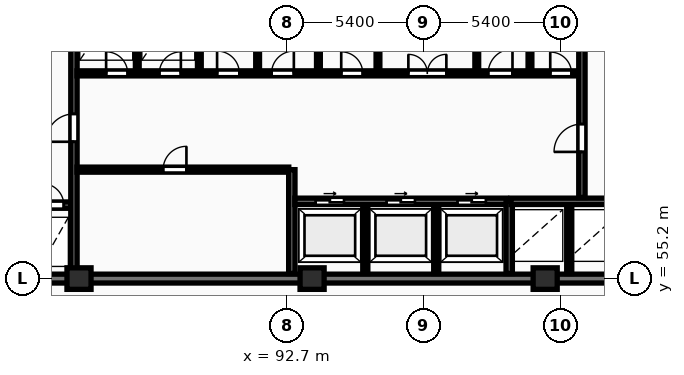
"""IFC4 building model, lengths in metres.
Left out: names, types, materials, properties, quantities, classifications, styles, units other than length and angle.
Written with IfcOpenShell. Run it as: python <this file> out.ifc"""

import sys

from ifc_helpers import new_model, si_unit, direction, frame, frame_2d, origin, origin_2d, place, context, subcontext, project, spatial, rectangle, extrude, element, fill, save


model = new_model("IFC4")
c1 = context("Model", 3, precision=1e-05, world=origin(), true_north=direction((0.0, 1.0)))
c2 = subcontext(c1, "Body", "Model", "MODEL_VIEW")
j1 = project(units=[si_unit("LENGTHUNIT", "METRE"), si_unit("PLANEANGLEUNIT", "RADIAN")], contexts=[c1])
p1 = place(None, origin())
s1 = spatial("IfcSite", under=j1, at=p1, CompositionType="ELEMENT")
p2 = place(p1, origin())
s2 = spatial("IfcBuilding", under=s1, at=p2, CompositionType="ELEMENT")
p3 = place(p2, frame((0.0, 0.0, 100.3)))
s3 = spatial("IfcBuildingStorey", under=s2, at=p3, CompositionType="ELEMENT", Elevation=100.3)
for number, where, z_axis, x_axis in (
    (1, (84.5, 55.2, 0.0), (0.0, 0.0, 1.0), (1.0, 0.0, 0.0)),
    (2, (93.7, 55.2, 0.0), (0.0, 0.0, 1.0), (1.0, 0.0, 0.0)),
    (3, (102.9, 55.2, 0.0), (0.0, 0.0, 1.0), (1.0, 0.0, 0.0)),
):
    element("IfcColumn", number, at=place(p3, frame(where, z_axis=z_axis, x_axis=x_axis)), inside=s3, PredefinedType="COLUMN", context=c2, shape_type="SweptSolid", body=[
        extrude(rectangle(XDim=0.95, YDim=0.85, at=origin_2d()), origin(), (0.0, 0.0, 1.0), 3.25),
    ])
p4 = place(p3, frame((75.95, 55.2, 0.0), z_axis=(0.0, 0.0, 1.0), x_axis=(1.0, 0.0, 0.0)))
e4 = element("IfcWall", 4, at=p4, inside=s3, PredefinedType="SHEAR", context=c2, shape_type="SweptSolid", body=[
    extrude(rectangle(XDim=36.3, YDim=0.35, at=frame_2d((18.15, 0.0))), origin(), (0.0, 0.0, 1.0), 3.25),
])
p5 = place(p3, frame((79.79, 58.1, 0.0), z_axis=(0.0, 0.0, 1.0), x_axis=(1.0, 0.0, 0.0)))
e5 = element("IfcWall", 5, at=p5, inside=s3, PredefinedType="SHEAR", context=c2, shape_type="SweptSolid", body=[
    extrude(rectangle(XDim=4.39, YDim=0.25, at=frame_2d((2.195, 0.0))), origin(), (0.0, 0.0, 1.0), 3.25),
])
p6 = place(p5, frame((1.05, 0.0, 0.0)))
e6 = element("IfcOpeningElement", 6, at=p6, cuts=e5, PredefinedType="OPENING", context=c2, shape_type="SweptSolid", body=[
    extrude(rectangle(XDim=1.12, YDim=2.12, at=frame_2d((0.56, 1.06))), frame((0.0, 0.135, 0.0), z_axis=(0.0, -1.0, 0.0), x_axis=(1.0, 0.0, 0.0)), (0.0, 0.0, 1.0), 0.27),
])
p7 = place(p5, frame((3.26, 0.0, 0.0)))
e7 = element("IfcOpeningElement", 7, at=p7, cuts=e5, PredefinedType="OPENING", context=c2, shape_type="SweptSolid", body=[
    extrude(rectangle(XDim=0.85, YDim=2.05, at=frame_2d((0.425, 1.025))), frame((0.0, 0.135, 0.0), z_axis=(0.0, -1.0, 0.0), x_axis=(1.0, 0.0, 0.0)), (0.0, 0.0, 1.0), 0.27),
])
p8 = place(p3, frame((84.3, 55.4, 0.0), z_axis=(0.0, 0.0, 1.0), x_axis=(0.0, 1.0, 0.0)))
e8 = element("IfcWall", 8, at=p8, inside=s3, PredefinedType="SHEAR", context=c2, shape_type="SweptSolid", body=[
    extrude(rectangle(XDim=11.6, YDim=0.25, at=frame_2d((5.8, 0.0))), origin(), (0.0, 0.0, 1.0), 3.25),
])
p9 = place(p8, frame((5.2, 0.0, 0.0)))
e9 = element("IfcOpeningElement", 9, at=p9, cuts=e8, PredefinedType="OPENING", context=c2, shape_type="SweptSolid", body=[
    extrude(rectangle(XDim=1.1, YDim=2.1, at=frame_2d((0.55, 1.05))), frame((0.0, 0.135, 0.0), z_axis=(0.0, -1.0, 0.0), x_axis=(1.0, 0.0, 0.0)), (0.0, 0.0, 1.0), 0.27),
])
p10 = place(p3, frame((84.42, 59.5, 0.0), z_axis=(0.0, 0.0, 1.0), x_axis=(1.0, 0.0, 0.0)))
e10 = element("IfcWall", 10, at=p10, inside=s3, PredefinedType="PARTITIONING", context=c2, shape_type="SweptSolid", body=[
    extrude(rectangle(XDim=8.36, YDim=0.2, at=frame_2d((4.18, 0.0))), origin(), (0.0, 0.0, 1.0), 2.97),
])
p11 = place(p10, frame((3.4, 0.0, 0.0)))
e11 = element("IfcOpeningElement", 11, at=p11, cuts=e10, PredefinedType="OPENING", context=c2, shape_type="SweptSolid", body=[
    extrude(rectangle(XDim=0.92, YDim=2.08, at=frame_2d((0.46, 1.04))), frame((0.0, 0.11, 0.0), z_axis=(0.0, -1.0, 0.0), x_axis=(1.0, 0.0, 0.0)), (0.0, 0.0, 1.0), 0.22),
])
p12 = place(p3, frame((92.9, 55.4, 0.0), z_axis=(0.0, 0.0, 1.0), x_axis=(0.0, 1.0, 0.0)))
e12 = element("IfcWall", 12, at=p12, inside=s3, PredefinedType="SHEAR", context=c2, shape_type="SweptSolid", body=[
    extrude(rectangle(XDim=4.1, YDim=0.25, at=frame_2d((2.05, 0.0))), origin(), (0.0, 0.0, 1.0), 3.25),
])
for number, where, z_axis, x_axis in (
    (13, (95.8, 55.4, 0.0), (0.0, 0.0, 1.0), (0.0, 1.0, 0.0)),
    (14, (98.6, 55.4, 0.0), (0.0, 0.0, 1.0), (0.0, 1.0, 0.0)),
):
    element("IfcWall", number, at=place(p3, frame(where, z_axis=z_axis, x_axis=x_axis)), inside=s3, PredefinedType="PARTITIONING", context=c2, shape_type="SweptSolid", body=[
        extrude(rectangle(XDim=2.72, YDim=0.2, at=frame_2d((1.36, 0.0))), origin(), (0.0, 0.0, 1.0), 2.97),
    ])
p13 = place(p3, frame((93.02, 58.25, 0.0), z_axis=(0.0, 0.0, 1.0), x_axis=(1.0, 0.0, 0.0)))
e15 = element("IfcWall", 15, at=p13, inside=s3, PredefinedType="SHEAR", context=c2, shape_type="SweptSolid", body=[
    extrude(rectangle(XDim=8.36, YDim=0.25, at=frame_2d((4.18, 0.0))), origin(), (0.0, 0.0, 1.0), 3.25),
])
p14 = place(p13, frame((0.82, 0.0, 0.0)))
e16 = element("IfcOpeningElement", 16, at=p14, cuts=e15, PredefinedType="OPENING", context=c2, shape_type="SweptSolid", body=[
    extrude(rectangle(XDim=1.12, YDim=2.12, at=frame_2d((0.56, 1.06))), frame((0.0, 0.135, 0.0), z_axis=(0.0, -1.0, 0.0), x_axis=(1.0, 0.0, 0.0)), (0.0, 0.0, 1.0), 0.27),
])
p15 = place(p13, frame((3.62, 0.0, 0.0)))
e17 = element("IfcOpeningElement", 17, at=p15, cuts=e15, PredefinedType="OPENING", context=c2, shape_type="SweptSolid", body=[
    extrude(rectangle(XDim=1.12, YDim=2.12, at=frame_2d((0.56, 1.06))), frame((0.0, 0.135, 0.0), z_axis=(0.0, -1.0, 0.0), x_axis=(1.0, 0.0, 0.0)), (0.0, 0.0, 1.0), 0.27),
])
p16 = place(p13, frame((6.42, 0.0, 0.0)))
e18 = element("IfcOpeningElement", 18, at=p16, cuts=e15, PredefinedType="OPENING", context=c2, shape_type="SweptSolid", body=[
    extrude(rectangle(XDim=1.12, YDim=2.12, at=frame_2d((0.56, 1.06))), frame((0.0, 0.135, 0.0), z_axis=(0.0, -1.0, 0.0), x_axis=(1.0, 0.0, 0.0)), (0.0, 0.0, 1.0), 0.27),
])
p17 = place(p3, frame((101.48, 55.4, 0.0), z_axis=(0.0, 0.0, 1.0), x_axis=(0.0, 1.0, 0.0)))
e19 = element("IfcWall", 19, at=p17, inside=s3, PredefinedType="SHEAR", context=c2, shape_type="SweptSolid", body=[
    extrude(rectangle(XDim=2.85, YDim=0.25, at=frame_2d((1.425, 0.0))), origin(), (0.0, 0.0, 1.0), 3.25),
])
p18 = place(p3, frame((103.85, 55.4, 0.0), z_axis=(0.0, 0.0, 1.0), x_axis=(0.0, 1.0, 0.0)))
e20 = element("IfcWall", 20, at=p18, inside=s3, PredefinedType="PARTITIONING", context=c2, shape_type="SweptSolid", body=[
    extrude(rectangle(XDim=2.72, YDim=0.2, at=frame_2d((1.36, 0.0))), origin(), (0.0, 0.0, 1.0), 2.97),
])
p19 = place(p3, frame((101.55, 58.25, 0.0), z_axis=(0.0, 0.0, 1.0), x_axis=(1.0, 0.0, 0.0)))
e21 = element("IfcWall", 21, at=p19, inside=s3, PredefinedType="SHEAR", context=c2, shape_type="SweptSolid", body=[
    extrude(rectangle(XDim=4.6, YDim=0.25, at=frame_2d((2.3, 0.0))), origin(), (0.0, 0.0, 1.0), 3.25),
])
for number, where, z_axis, x_axis in (
    (22, (86.8, 63.4, 0.0), (0.0, 0.0, 1.0), (0.0, 1.0, 0.0)),
    (23, (89.25, 63.4, 0.0), (0.0, 0.0, 1.0), (0.0, 1.0, 0.0)),
    (24, (91.55, 63.4, 0.0), (0.0, 0.0, 1.0), (0.0, 1.0, 0.0)),
):
    element("IfcWall", number, at=place(p3, frame(where, z_axis=z_axis, x_axis=x_axis)), inside=s3, PredefinedType="PARTITIONING", context=c2, shape_type="SweptSolid", body=[
        extrude(rectangle(XDim=3.6, YDim=0.15, at=frame_2d((1.8, 0.0))), origin(), (0.0, 0.0, 1.0), 2.97),
    ])
p20 = place(p3, frame((93.95, 63.4, 0.0), z_axis=(0.0, 0.0, 1.0), x_axis=(0.0, 1.0, 0.0)))
e25 = element("IfcWall", 25, at=p20, inside=s3, PredefinedType="PARTITIONING", context=c2, shape_type="SweptSolid", body=[
    extrude(rectangle(XDim=3.6, YDim=0.15, at=frame_2d((1.8, 0.0))), origin(), (0.0, 0.0, 1.0), 2.277),
])
for number, where, z_axis, x_axis in (
    (26, (102.3, 63.4, 0.0), (0.0, 0.0, 1.0), (0.0, 1.0, 0.0)),
    (27, (96.3, 63.4, 0.0), (0.0, 0.0, 1.0), (0.0, 1.0, 0.0)),
    (28, (100.2, 63.4, 0.0), (0.0, 0.0, 1.0), (0.0, 1.0, 0.0)),
):
    element("IfcWall", number, at=place(p3, frame(where, z_axis=z_axis, x_axis=x_axis)), inside=s3, PredefinedType="PARTITIONING", context=c2, shape_type="SweptSolid", body=[
        extrude(rectangle(XDim=3.6, YDim=0.15, at=frame_2d((1.8, 0.0))), origin(), (0.0, 0.0, 1.0), 2.97),
    ])
p21 = place(p3, frame((84.42, 63.3, 0.0), z_axis=(0.0, 0.0, 1.0), x_axis=(1.0, 0.0, 0.0)))
e29 = element("IfcWall", 29, at=p21, inside=s3, PredefinedType="PARTITIONING", context=c2, shape_type="SweptSolid", body=[
    extrude(rectangle(XDim=19.83, YDim=0.2, at=frame_2d((9.915, 0.0))), origin(), (0.0, 0.0, 1.0), 2.97),
])
p22 = place(p21, frame((1.15, 0.0, 0.0)))
e30 = element("IfcOpeningElement", 30, at=p22, cuts=e29, PredefinedType="OPENING", context=c2, shape_type="SweptSolid", body=[
    extrude(rectangle(XDim=0.85, YDim=2.05, at=frame_2d((0.425, 1.025))), frame((0.0, 0.11, 0.0), z_axis=(0.0, -1.0, 0.0), x_axis=(1.0, 0.0, 0.0)), (0.0, 0.0, 1.0), 0.22),
])
p23 = place(p21, frame((3.25, 0.0, 0.0)))
e31 = element("IfcOpeningElement", 31, at=p23, cuts=e29, PredefinedType="OPENING", context=c2, shape_type="SweptSolid", body=[
    extrude(rectangle(XDim=0.85, YDim=2.05, at=frame_2d((0.425, 1.025))), frame((0.0, 0.11, 0.0), z_axis=(0.0, -1.0, 0.0), x_axis=(1.0, 0.0, 0.0)), (0.0, 0.0, 1.0), 0.22),
])
p24 = place(p21, frame((13.08, 0.0, 0.0)))
e32 = element("IfcOpeningElement", 32, at=p24, cuts=e29, PredefinedType="OPENING", context=c2, shape_type="SweptSolid", body=[
    extrude(rectangle(XDim=1.5, YDim=2.2, at=frame_2d((0.75, 1.1))), frame((0.0, 0.11, 0.0), z_axis=(0.0, -1.0, 0.0), x_axis=(1.0, 0.0, 0.0)), (0.0, 0.0, 1.0), 0.22),
])
p25 = place(p21, frame((5.53, 0.0, 0.0)))
e33 = element("IfcOpeningElement", 33, at=p25, cuts=e29, PredefinedType="OPENING", context=c2, shape_type="SweptSolid", body=[
    extrude(rectangle(XDim=0.88, YDim=2.06, at=frame_2d((0.44, 1.03))), frame((0.0, 0.11, 0.0), z_axis=(0.0, -1.0, 0.0), x_axis=(1.0, 0.0, 0.0)), (0.0, 0.0, 1.0), 0.22),
])
p26 = place(p21, frame((7.68, 0.0, 0.0)))
e34 = element("IfcOpeningElement", 34, at=p26, cuts=e29, PredefinedType="OPENING", context=c2, shape_type="SweptSolid", body=[
    extrude(rectangle(XDim=0.88, YDim=2.06, at=frame_2d((0.44, 1.03))), frame((0.0, 0.11, 0.0), z_axis=(0.0, -1.0, 0.0), x_axis=(1.0, 0.0, 0.0)), (0.0, 0.0, 1.0), 0.22),
])
p27 = place(p21, frame((10.43, 0.0, 0.0)))
e35 = element("IfcOpeningElement", 35, at=p27, cuts=e29, PredefinedType="OPENING", context=c2, shape_type="SweptSolid", body=[
    extrude(rectangle(XDim=0.85, YDim=2.05, at=frame_2d((0.425, 1.025))), frame((0.0, 0.11, 0.0), z_axis=(0.0, -1.0, 0.0), x_axis=(1.0, 0.0, 0.0)), (0.0, 0.0, 1.0), 0.22),
])
p28 = place(p21, frame((16.23, 0.0, 0.0)))
e36 = element("IfcOpeningElement", 36, at=p28, cuts=e29, PredefinedType="OPENING", context=c2, shape_type="SweptSolid", body=[
    extrude(rectangle(XDim=0.96, YDim=2.1, at=frame_2d((0.48, 1.05))), frame((0.0, 0.11, 0.0), z_axis=(0.0, -1.0, 0.0), x_axis=(1.0, 0.0, 0.0)), (0.0, 0.0, 1.0), 0.22),
])
p29 = place(p21, frame((18.68, 0.0, 0.0)))
e37 = element("IfcOpeningElement", 37, at=p29, cuts=e29, PredefinedType="OPENING", context=c2, shape_type="SweptSolid", body=[
    extrude(rectangle(XDim=0.84, YDim=2.04, at=frame_2d((0.42, 1.02))), frame((0.0, 0.11, 0.0), z_axis=(0.0, -1.0, 0.0), x_axis=(1.0, 0.0, 0.0)), (0.0, 0.0, 1.0), 0.22),
])
p30 = place(p3, frame((104.35, 58.4, 0.0), z_axis=(0.0, 0.0, 1.0), x_axis=(0.0, 1.0, 0.0)))
e38 = element("IfcWall", 38, at=p30, inside=s3, PredefinedType="SHEAR", context=c2, shape_type="SweptSolid", body=[
    extrude(rectangle(XDim=8.6, YDim=0.25, at=frame_2d((4.3, 0.0))), origin(), (0.0, 0.0, 1.0), 3.25),
])
p31 = place(p30, frame((1.8, 0.0, 0.0)))
e39 = element("IfcOpeningElement", 39, at=p31, cuts=e38, PredefinedType="OPENING", context=c2, shape_type="SweptSolid", body=[
    extrude(rectangle(XDim=1.1, YDim=2.1, at=frame_2d((0.55, 1.05))), frame((0.0, 0.135, 0.0), z_axis=(0.0, -1.0, 0.0), x_axis=(1.0, 0.0, 0.0)), (0.0, 0.0, 1.0), 0.27),
])
p32 = place(p7, origin())
e40 = element("IfcDoor", 40, at=p32, inside=s3, OperationType="SINGLE_SWING_LEFT", PredefinedType="DOOR", context=c2, shape_type="SweptSolid", body=[
    extrude(rectangle(XDim=0.85, YDim=2.05, at=frame_2d((0.425, 1.025))), frame((0.0, 0.025, 0.0), z_axis=(0.0, -1.0, 0.0), x_axis=(1.0, 0.0, 0.0)), (0.0, 0.0, 1.0), 0.05),
])
fill(e7, e40)
p33 = place(p9, origin())
e41 = element("IfcDoor", 41, at=p33, inside=s3, OperationType="SINGLE_SWING_LEFT", PredefinedType="DOOR", context=c2, shape_type="SweptSolid", body=[
    extrude(rectangle(XDim=1.1, YDim=2.1, at=frame_2d((0.55, 1.05))), frame((0.0, 0.025, 0.0), z_axis=(0.0, -1.0, 0.0), x_axis=(1.0, 0.0, 0.0)), (0.0, 0.0, 1.0), 0.05),
])
fill(e9, e41)
p34 = place(p11, origin())
e42 = element("IfcDoor", 42, at=p34, inside=s3, OperationType="SINGLE_SWING_RIGHT", PredefinedType="DOOR", context=c2, shape_type="SweptSolid", body=[
    extrude(rectangle(XDim=0.92, YDim=2.08, at=frame_2d((0.46, 1.04))), frame((0.0, 0.025, 0.0), z_axis=(0.0, -1.0, 0.0), x_axis=(1.0, 0.0, 0.0)), (0.0, 0.0, 1.0), 0.05),
])
fill(e11, e42)
p35 = place(p14, origin())
e43 = element("IfcDoor", 43, at=p35, inside=s3, OperationType="SLIDING_TO_RIGHT", PredefinedType="DOOR", context=c2, shape_type="SweptSolid", body=[
    extrude(rectangle(XDim=1.12, YDim=2.12, at=frame_2d((0.56, 1.06))), frame((0.0, 0.025, 0.0), z_axis=(0.0, -1.0, 0.0), x_axis=(1.0, 0.0, 0.0)), (0.0, 0.0, 1.0), 0.05),
])
fill(e16, e43)
p36 = place(p15, origin())
e44 = element("IfcDoor", 44, at=p36, inside=s3, OperationType="SLIDING_TO_RIGHT", PredefinedType="DOOR", context=c2, shape_type="SweptSolid", body=[
    extrude(rectangle(XDim=1.12, YDim=2.12, at=frame_2d((0.56, 1.06))), frame((0.0, 0.025, 0.0), z_axis=(0.0, -1.0, 0.0), x_axis=(1.0, 0.0, 0.0)), (0.0, 0.0, 1.0), 0.05),
])
fill(e17, e44)
p37 = place(p16, origin())
e45 = element("IfcDoor", 45, at=p37, inside=s3, OperationType="SLIDING_TO_RIGHT", PredefinedType="DOOR", context=c2, shape_type="SweptSolid", body=[
    extrude(rectangle(XDim=1.12, YDim=2.12, at=frame_2d((0.56, 1.06))), frame((0.0, 0.025, 0.0), z_axis=(0.0, -1.0, 0.0), x_axis=(1.0, 0.0, 0.0)), (0.0, 0.0, 1.0), 0.05),
])
fill(e18, e45)
p38 = place(p22, origin())
e46 = element("IfcDoor", 46, at=p38, inside=s3, OperationType="SINGLE_SWING_LEFT", PredefinedType="DOOR", context=c2, shape_type="SweptSolid", body=[
    extrude(rectangle(XDim=0.85, YDim=2.05, at=frame_2d((0.425, 1.025))), frame((0.0, 0.025, 0.0), z_axis=(0.0, -1.0, 0.0), x_axis=(1.0, 0.0, 0.0)), (0.0, 0.0, 1.0), 0.05),
])
fill(e30, e46)
p39 = place(p23, origin())
e47 = element("IfcDoor", 47, at=p39, inside=s3, OperationType="SINGLE_SWING_RIGHT", PredefinedType="DOOR", context=c2, shape_type="SweptSolid", body=[
    extrude(rectangle(XDim=0.85, YDim=2.05, at=frame_2d((0.425, 1.025))), frame((0.0, 0.025, 0.0), z_axis=(0.0, -1.0, 0.0), x_axis=(1.0, 0.0, 0.0)), (0.0, 0.0, 1.0), 0.05),
])
fill(e31, e47)
p40 = place(p24, origin())
e48 = element("IfcDoor", 48, at=p40, inside=s3, OperationType="DOUBLE_DOOR_SINGLE_SWING", PredefinedType="DOOR", context=c2, shape_type="SweptSolid", body=[
    extrude(rectangle(XDim=1.5, YDim=2.2, at=frame_2d((0.75, 1.1))), frame((0.0, 0.025, 0.0), z_axis=(0.0, -1.0, 0.0), x_axis=(1.0, 0.0, 0.0)), (0.0, 0.0, 1.0), 0.05),
])
fill(e32, e48)
p41 = place(p25, origin())
e49 = element("IfcDoor", 49, at=p41, inside=s3, OperationType="SINGLE_SWING_LEFT", PredefinedType="DOOR", context=c2, shape_type="SweptSolid", body=[
    extrude(rectangle(XDim=0.88, YDim=2.06, at=frame_2d((0.44, 1.03))), frame((0.0, 0.025, 0.0), z_axis=(0.0, -1.0, 0.0), x_axis=(1.0, 0.0, 0.0)), (0.0, 0.0, 1.0), 0.05),
])
fill(e33, e49)
p42 = place(p26, origin())
e50 = element("IfcDoor", 50, at=p42, inside=s3, OperationType="SINGLE_SWING_RIGHT", PredefinedType="DOOR", context=c2, shape_type="SweptSolid", body=[
    extrude(rectangle(XDim=0.88, YDim=2.06, at=frame_2d((0.44, 1.03))), frame((0.0, 0.025, 0.0), z_axis=(0.0, -1.0, 0.0), x_axis=(1.0, 0.0, 0.0)), (0.0, 0.0, 1.0), 0.05),
])
fill(e34, e50)
p43 = place(p27, origin())
e51 = element("IfcDoor", 51, at=p43, inside=s3, OperationType="SINGLE_SWING_LEFT", PredefinedType="DOOR", context=c2, shape_type="SweptSolid", body=[
    extrude(rectangle(XDim=0.85, YDim=2.05, at=frame_2d((0.425, 1.025))), frame((0.0, 0.025, 0.0), z_axis=(0.0, -1.0, 0.0), x_axis=(1.0, 0.0, 0.0)), (0.0, 0.0, 1.0), 0.05),
])
fill(e35, e51)
p44 = place(p28, origin())
e52 = element("IfcDoor", 52, at=p44, inside=s3, OperationType="SINGLE_SWING_RIGHT", PredefinedType="DOOR", context=c2, shape_type="SweptSolid", body=[
    extrude(rectangle(XDim=0.96, YDim=2.1, at=frame_2d((0.48, 1.05))), frame((0.0, 0.025, 0.0), z_axis=(0.0, -1.0, 0.0), x_axis=(1.0, 0.0, 0.0)), (0.0, 0.0, 1.0), 0.05),
])
fill(e36, e52)
p45 = place(p29, origin())
e53 = element("IfcDoor", 53, at=p45, inside=s3, OperationType="SINGLE_SWING_LEFT", PredefinedType="DOOR", context=c2, shape_type="SweptSolid", body=[
    extrude(rectangle(XDim=0.84, YDim=2.04, at=frame_2d((0.42, 1.02))), frame((0.0, 0.025, 0.0), z_axis=(0.0, -1.0, 0.0), x_axis=(1.0, 0.0, 0.0)), (0.0, 0.0, 1.0), 0.05),
])
fill(e37, e53)
p46 = place(p31, origin())
e54 = element("IfcDoor", 54, at=p46, inside=s3, OperationType="SINGLE_SWING_LEFT", PredefinedType="DOOR", context=c2, shape_type="SweptSolid", body=[
    extrude(rectangle(XDim=1.1, YDim=2.1, at=frame_2d((0.55, 1.05))), frame((0.0, 0.025, 0.0), z_axis=(0.0, -1.0, 0.0), x_axis=(1.0, 0.0, 0.0)), (0.0, 0.0, 1.0), 0.05),
])
fill(e39, e54)
save(model, sys.argv[1])
